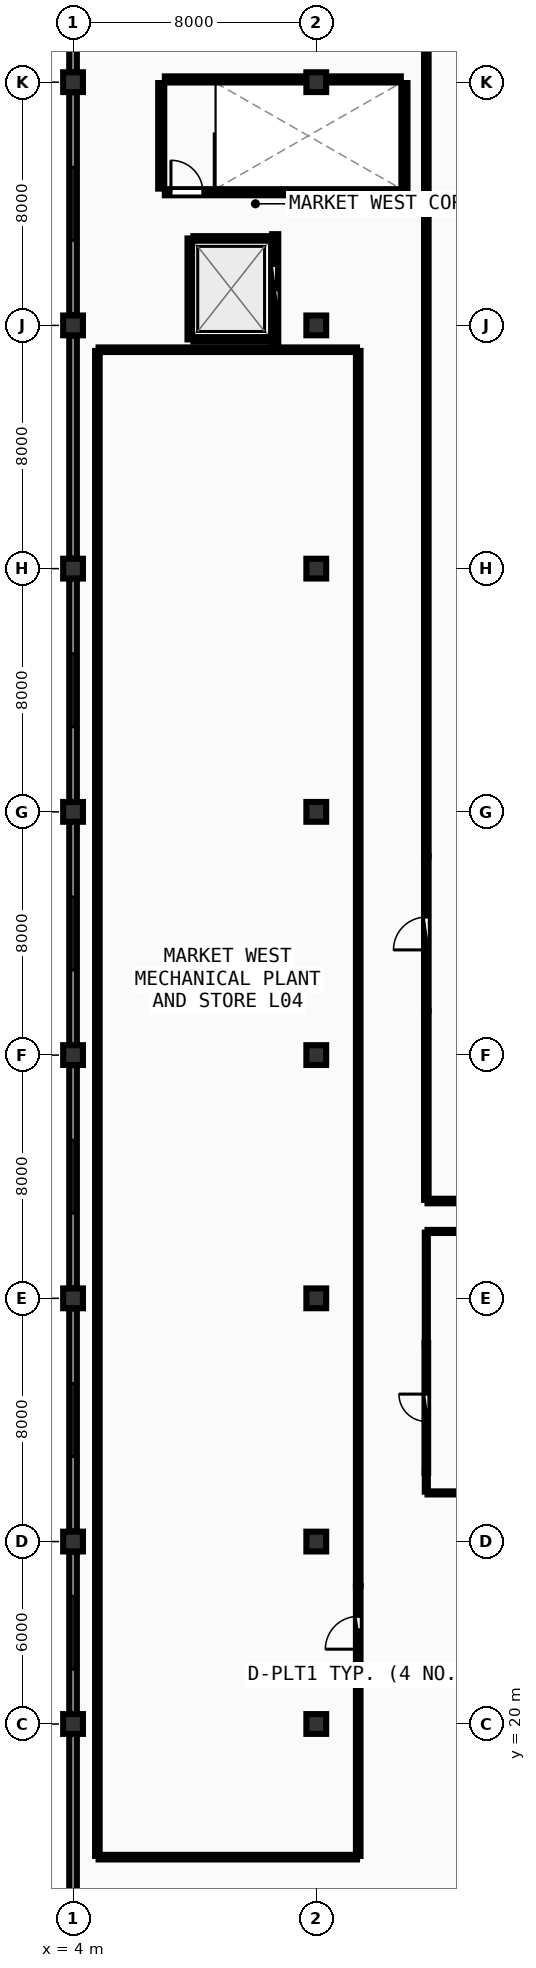
"""IFC4 building model, lengths in metres.
Left out: names, types, materials, properties, quantities, classifications, styles, units other than length and angle.
Written with IfcOpenShell. Run it as: python <this file> out.ifc"""

import sys

from ifc_helpers import new_model, si_unit, direction, frame, frame_2d, origin, origin_2d, place, context, subcontext, project, spatial, rectangle, extrude, element, fill, save


model = new_model("IFC4")
c1 = context("Model", 3, precision=1e-05, world=origin(), true_north=direction((0.0, 1.0)))
c2 = subcontext(c1, "Body", "Model", "MODEL_VIEW")
j1 = project(units=[si_unit("LENGTHUNIT", "METRE"), si_unit("PLANEANGLEUNIT", "RADIAN")], contexts=[c1])
p1 = place(None, origin())
s1 = spatial("IfcSite", under=j1, at=p1, CompositionType="ELEMENT")
p2 = place(p1, origin())
s2 = spatial("IfcBuilding", under=s1, at=p2, CompositionType="ELEMENT")
p3 = place(p2, frame((0.0, 0.0, 18.0)))
s3 = spatial("IfcBuildingStorey", under=s2, at=p3, CompositionType="ELEMENT", Elevation=18.0)
for number, where, z_axis, x_axis in (
    (1, (4.0, 20.0, 0.0), (0.0, 0.0, 1.0), (1.0, 0.0, 0.0)),
    (2, (4.0, 26.0, 0.0), (0.0, 0.0, 1.0), (1.0, 0.0, 0.0)),
    (3, (4.0, 34.0, 0.0), (0.0, 0.0, 1.0), (1.0, 0.0, 0.0)),
    (4, (4.0, 42.0, 0.0), (0.0, 0.0, 1.0), (1.0, 0.0, 0.0)),
    (5, (4.0, 50.0, 0.0), (0.0, 0.0, 1.0), (1.0, 0.0, 0.0)),
    (6, (4.0, 58.0, 0.0), (0.0, 0.0, 1.0), (1.0, 0.0, 0.0)),
    (7, (4.0, 66.0, 0.0), (0.0, 0.0, 1.0), (1.0, 0.0, 0.0)),
    (8, (4.0, 74.0, 0.0), (0.0, 0.0, 1.0), (1.0, 0.0, 0.0)),
    (9, (12.0, 20.0, 0.0), (0.0, 0.0, 1.0), (1.0, 0.0, 0.0)),
    (10, (12.0, 26.0, 0.0), (0.0, 0.0, 1.0), (1.0, 0.0, 0.0)),
    (11, (12.0, 34.0, 0.0), (0.0, 0.0, 1.0), (1.0, 0.0, 0.0)),
    (12, (12.0, 42.0, 0.0), (0.0, 0.0, 1.0), (1.0, 0.0, 0.0)),
    (13, (12.0, 50.0, 0.0), (0.0, 0.0, 1.0), (1.0, 0.0, 0.0)),
    (14, (12.0, 58.0, 0.0), (0.0, 0.0, 1.0), (1.0, 0.0, 0.0)),
    (15, (12.0, 66.0, 0.0), (0.0, 0.0, 1.0), (1.0, 0.0, 0.0)),
    (16, (12.0, 74.0, 0.0), (0.0, 0.0, 1.0), (1.0, 0.0, 0.0)),
):
    element("IfcColumn", number, at=place(p3, frame(where, z_axis=z_axis, x_axis=x_axis)), inside=s3, PredefinedType="COLUMN", context=c2, shape_type="SweptSolid", body=[
        extrude(rectangle(XDim=0.65, YDim=0.65, at=origin_2d()), origin(), (0.0, 0.0, 1.0), 4.5),
    ])
p4 = place(p3, frame((4.0, 81.67, 0.0), z_axis=(0.0, 0.0, 1.0), x_axis=(0.0, -1.0, 0.0)))
e17 = element("IfcWall", 17, at=p4, inside=s3, PredefinedType="SOLIDWALL", context=c2, shape_type="SweptSolid", body=[
    extrude(rectangle(XDim=7.34, YDim=0.25, at=frame_2d((3.67, 0.0))), origin(), (0.0, 0.0, 1.0), 3.44),
])
p5 = place(p4, frame((2.47, 0.0, 0.95)))
e18 = element("IfcOpeningElement", 18, at=p5, cuts=e17, PredefinedType="OPENING", context=c2, shape_type="SweptSolid", body=[
    extrude(rectangle(XDim=2.4, YDim=1.65, at=frame_2d((1.2, 0.825))), frame((0.0, 0.135, 0.0), z_axis=(0.0, -1.0, 0.0), x_axis=(1.0, 0.0, 0.0)), (0.0, 0.0, 1.0), 0.27),
])
p6 = place(p3, frame((4.0, 73.67, 0.0), z_axis=(0.0, 0.0, 1.0), x_axis=(0.0, -1.0, 0.0)))
e19 = element("IfcWall", 19, at=p6, inside=s3, PredefinedType="SOLIDWALL", context=c2, shape_type="SweptSolid", body=[
    extrude(rectangle(XDim=7.34, YDim=0.25, at=frame_2d((3.67, 0.0))), origin(), (0.0, 0.0, 1.0), 3.44),
])
p7 = place(p6, frame((2.47, 0.0, 0.95)))
e20 = element("IfcOpeningElement", 20, at=p7, cuts=e19, PredefinedType="OPENING", context=c2, shape_type="SweptSolid", body=[
    extrude(rectangle(XDim=2.4, YDim=1.65, at=frame_2d((1.2, 0.825))), frame((0.0, 0.135, 0.0), z_axis=(0.0, -1.0, 0.0), x_axis=(1.0, 0.0, 0.0)), (0.0, 0.0, 1.0), 0.27),
])
p8 = place(p3, frame((4.0, 65.67, 0.0), z_axis=(0.0, 0.0, 1.0), x_axis=(0.0, -1.0, 0.0)))
e21 = element("IfcWall", 21, at=p8, inside=s3, PredefinedType="SOLIDWALL", context=c2, shape_type="SweptSolid", body=[
    extrude(rectangle(XDim=7.34, YDim=0.25, at=frame_2d((3.67, 0.0))), origin(), (0.0, 0.0, 1.0), 3.44),
])
p9 = place(p3, frame((4.0, 57.67, 0.0), z_axis=(0.0, 0.0, 1.0), x_axis=(0.0, -1.0, 0.0)))
e22 = element("IfcWall", 22, at=p9, inside=s3, PredefinedType="SOLIDWALL", context=c2, shape_type="SweptSolid", body=[
    extrude(rectangle(XDim=7.34, YDim=0.25, at=frame_2d((3.67, 0.0))), origin(), (0.0, 0.0, 1.0), 3.44),
])
p10 = place(p9, frame((2.47, 0.0, 0.95)))
e23 = element("IfcOpeningElement", 23, at=p10, cuts=e22, PredefinedType="OPENING", context=c2, shape_type="SweptSolid", body=[
    extrude(rectangle(XDim=2.4, YDim=1.65, at=frame_2d((1.2, 0.825))), frame((0.0, 0.135, 0.0), z_axis=(0.0, -1.0, 0.0), x_axis=(1.0, 0.0, 0.0)), (0.0, 0.0, 1.0), 0.27),
])
p11 = place(p3, frame((4.0, 49.67, 0.0), z_axis=(0.0, 0.0, 1.0), x_axis=(0.0, -1.0, 0.0)))
e24 = element("IfcWall", 24, at=p11, inside=s3, PredefinedType="SOLIDWALL", context=c2, shape_type="SweptSolid", body=[
    extrude(rectangle(XDim=7.34, YDim=0.25, at=frame_2d((3.67, 0.0))), origin(), (0.0, 0.0, 1.0), 3.44),
])
p12 = place(p11, frame((2.47, 0.0, 0.95)))
e25 = element("IfcOpeningElement", 25, at=p12, cuts=e24, PredefinedType="OPENING", context=c2, shape_type="SweptSolid", body=[
    extrude(rectangle(XDim=2.4, YDim=1.65, at=frame_2d((1.2, 0.825))), frame((0.0, 0.135, 0.0), z_axis=(0.0, -1.0, 0.0), x_axis=(1.0, 0.0, 0.0)), (0.0, 0.0, 1.0), 0.27),
])
p13 = place(p3, frame((4.0, 41.67, 0.0), z_axis=(0.0, 0.0, 1.0), x_axis=(0.0, -1.0, 0.0)))
e26 = element("IfcWall", 26, at=p13, inside=s3, PredefinedType="SOLIDWALL", context=c2, shape_type="SweptSolid", body=[
    extrude(rectangle(XDim=7.34, YDim=0.25, at=frame_2d((3.67, 0.0))), origin(), (0.0, 0.0, 1.0), 3.44),
])
p14 = place(p13, frame((2.47, 0.0, 0.95)))
e27 = element("IfcOpeningElement", 27, at=p14, cuts=e26, PredefinedType="OPENING", context=c2, shape_type="SweptSolid", body=[
    extrude(rectangle(XDim=2.4, YDim=1.65, at=frame_2d((1.2, 0.825))), frame((0.0, 0.135, 0.0), z_axis=(0.0, -1.0, 0.0), x_axis=(1.0, 0.0, 0.0)), (0.0, 0.0, 1.0), 0.27),
])
p15 = place(p3, frame((4.0, 33.67, 0.0), z_axis=(0.0, 0.0, 1.0), x_axis=(0.0, -1.0, 0.0)))
e28 = element("IfcWall", 28, at=p15, inside=s3, PredefinedType="SOLIDWALL", context=c2, shape_type="SweptSolid", body=[
    extrude(rectangle(XDim=7.34, YDim=0.25, at=frame_2d((3.67, 0.0))), origin(), (0.0, 0.0, 1.0), 3.44),
])
p16 = place(p15, frame((2.47, 0.0, 0.95)))
e29 = element("IfcOpeningElement", 29, at=p16, cuts=e28, PredefinedType="OPENING", context=c2, shape_type="SweptSolid", body=[
    extrude(rectangle(XDim=2.4, YDim=1.65, at=frame_2d((1.2, 0.825))), frame((0.0, 0.135, 0.0), z_axis=(0.0, -1.0, 0.0), x_axis=(1.0, 0.0, 0.0)), (0.0, 0.0, 1.0), 0.27),
])
p17 = place(p3, frame((4.0, 25.67, 0.0), z_axis=(0.0, 0.0, 1.0), x_axis=(0.0, -1.0, 0.0)))
e30 = element("IfcWall", 30, at=p17, inside=s3, PredefinedType="SOLIDWALL", context=c2, shape_type="SweptSolid", body=[
    extrude(rectangle(XDim=5.34, YDim=0.25, at=frame_2d((2.67, 0.0))), origin(), (0.0, 0.0, 1.0), 3.44),
])
p18 = place(p17, frame((1.47, 0.0, 0.95)))
e31 = element("IfcOpeningElement", 31, at=p18, cuts=e30, PredefinedType="OPENING", context=c2, shape_type="SweptSolid", body=[
    extrude(rectangle(XDim=2.4, YDim=1.65, at=frame_2d((1.2, 0.825))), frame((0.0, 0.135, 0.0), z_axis=(0.0, -1.0, 0.0), x_axis=(1.0, 0.0, 0.0)), (0.0, 0.0, 1.0), 0.27),
])
p19 = place(p3, frame((4.0, 19.67, 0.0), z_axis=(0.0, 0.0, 1.0), x_axis=(0.0, -1.0, 0.0)))
e32 = element("IfcWall", 32, at=p19, inside=s3, PredefinedType="SOLIDWALL", context=c2, shape_type="SweptSolid", body=[
    extrude(rectangle(XDim=7.34, YDim=0.25, at=frame_2d((3.67, 0.0))), origin(), (0.0, 0.0, 1.0), 3.44),
])
p20 = place(p3, frame((7.02, 70.38, 0.0), z_axis=(0.0, 0.0, 1.0), x_axis=(1.0, 0.0, 0.0)))
e33 = element("IfcWall", 33, at=p20, inside=s3, PredefinedType="SHEAR", context=c2, shape_type="SweptSolid", body=[
    extrude(rectangle(XDim=7.76, YDim=0.2, at=frame_2d((3.88, 0.0))), origin(), (0.0, 0.0, 1.0), 4.26),
])
p21 = place(p20, frame((0.2, 0.0, 0.0)))
e34 = element("IfcOpeningElement", 34, at=p21, cuts=e33, PredefinedType="OPENING", context=c2, shape_type="SweptSolid", body=[
    extrude(rectangle(XDim=1.05, YDim=2.1, at=frame_2d((0.525, 1.05))), frame((0.0, 0.11, 0.0), z_axis=(0.0, -1.0, 0.0), x_axis=(1.0, 0.0, 0.0)), (0.0, 0.0, 1.0), 0.22),
])
p22 = place(p3, frame((14.9, 70.5, 0.0), z_axis=(0.0, 0.0, 1.0), x_axis=(0.0, 1.0, 0.0)))
e35 = element("IfcWall", 35, at=p22, inside=s3, PredefinedType="SHEAR", context=c2, shape_type="SweptSolid", body=[
    extrude(rectangle(XDim=3.47, YDim=0.2, at=frame_2d((1.735, 0.0))), origin(), (0.0, 0.0, 1.0), 4.26),
])
p23 = place(p3, frame((14.78, 74.09, 0.0), z_axis=(0.0, 0.0, 1.0), x_axis=(-1.0, 0.0, 0.0)))
e36 = element("IfcWall", 36, at=p23, inside=s3, PredefinedType="SHEAR", context=c2, shape_type="SweptSolid", body=[
    extrude(rectangle(XDim=7.76, YDim=0.2, at=frame_2d((3.88, 0.0))), origin(), (0.0, 0.0, 1.0), 4.26),
])
p24 = place(p3, frame((6.9, 73.97, 0.0), z_axis=(0.0, 0.0, 1.0), x_axis=(0.0, -1.0, 0.0)))
e37 = element("IfcWall", 37, at=p24, inside=s3, PredefinedType="SHEAR", context=c2, shape_type="SweptSolid", body=[
    extrude(rectangle(XDim=3.47, YDim=0.2, at=frame_2d((1.735, 0.0))), origin(), (0.0, 0.0, 1.0), 4.26),
])
p25 = place(p3, frame((10.65, 65.4, 0.0), z_axis=(0.0, 0.0, 1.0), x_axis=(0.0, 1.0, 0.0)))
e38 = element("IfcWall", 38, at=p25, inside=s3, PredefinedType="SOLIDWALL", context=c2, shape_type="SweptSolid", body=[
    extrude(rectangle(XDim=3.6, YDim=0.2, at=frame_2d((1.8, 0.0))), origin(), (0.0, 0.0, 1.0), 3.445),
])
p26 = place(p25, frame((1.02, 0.0, 0.0)))
e39 = element("IfcOpeningElement", 39, at=p26, cuts=e38, PredefinedType="OPENING", context=c2, shape_type="SweptSolid", body=[
    extrude(rectangle(XDim=1.55, YDim=2.2, at=frame_2d((0.775, 1.1))), frame((0.0, 0.11, 0.0), z_axis=(0.0, -1.0, 0.0), x_axis=(1.0, 0.0, 0.0)), (0.0, 0.0, 1.0), 0.22),
])
p27 = place(p3, frame((7.84, 65.54, 0.0), z_axis=(0.0, 0.0, 1.0), x_axis=(0.0, 1.0, 0.0)))
e40 = element("IfcWall", 40, at=p27, inside=s3, PredefinedType="PARTITIONING", context=c2, shape_type="SweptSolid", body=[
    extrude(rectangle(XDim=3.32, YDim=0.15, at=frame_2d((1.66, 0.0))), origin(), (0.0, 0.0, 1.0), 3.445),
])
for number, where, z_axis, x_axis in (
    (41, (7.96, 65.54, 0.0), (0.0, 0.0, 1.0), (1.0, 0.0, 0.0)),
    (42, (7.96, 68.86, 0.0), (0.0, 0.0, 1.0), (1.0, 0.0, 0.0)),
):
    element("IfcWall", number, at=place(p3, frame(where, z_axis=z_axis, x_axis=x_axis)), inside=s3, PredefinedType="PARTITIONING", context=c2, shape_type="SweptSolid", body=[
        extrude(rectangle(XDim=2.56, YDim=0.15, at=frame_2d((1.28, 0.0))), origin(), (0.0, 0.0, 1.0), 4.25),
    ])
p28 = place(p3, frame((15.62, 28.26, 0.0), z_axis=(0.0, 0.0, 1.0), x_axis=(0.0, 1.0, 0.0)))
e43 = element("IfcWall", 43, at=p28, inside=s3, PredefinedType="PARTITIONING", context=c2, shape_type="SweptSolid", body=[
    extrude(rectangle(XDim=4.28, YDim=0.12, at=frame_2d((2.14, 0.0))), origin(), (0.0, 0.0, 1.0), 4.23),
])
p29 = place(p28, frame((1.69, 0.0, 0.0)))
e44 = element("IfcOpeningElement", 44, at=p29, cuts=e43, PredefinedType="OPENING", context=c2, shape_type="SweptSolid", body=[
    extrude(rectangle(XDim=0.9, YDim=2.08, at=frame_2d((0.45, 1.04))), frame((0.0, 0.07, 0.0), z_axis=(0.0, -1.0, 0.0), x_axis=(1.0, 0.0, 0.0)), (0.0, 0.0, 1.0), 0.14),
])
p30 = place(p3, frame((15.62, 43.46, 0.0), z_axis=(0.0, 0.0, 1.0), x_axis=(0.0, 1.0, 0.0)))
e45 = element("IfcWall", 45, at=p30, inside=s3, PredefinedType="PARTITIONING", context=c2, shape_type="SweptSolid", body=[
    extrude(rectangle(XDim=5.08, YDim=0.15, at=frame_2d((2.54, 0.0))), origin(), (0.0, 0.0, 1.0), 4.23),
])
p31 = place(p30, frame((2.0, 0.0, 0.0)))
e46 = element("IfcOpeningElement", 46, at=p31, cuts=e45, PredefinedType="OPENING", context=c2, shape_type="SweptSolid", body=[
    extrude(rectangle(XDim=1.08, YDim=2.1, at=frame_2d((0.54, 1.05))), frame((0.0, 0.085, 0.0), z_axis=(0.0, -1.0, 0.0), x_axis=(1.0, 0.0, 0.0)), (0.0, 0.0, 1.0), 0.17),
])
p32 = place(p3, frame((13.38, 21.46, 0.0), z_axis=(0.0, 0.0, 1.0), x_axis=(0.0, 1.0, 0.0)))
e47 = element("IfcWall", 47, at=p32, inside=s3, PredefinedType="PARTITIONING", context=c2, shape_type="SweptSolid", body=[
    extrude(rectangle(XDim=3.08, YDim=0.15, at=frame_2d((1.54, 0.0))), origin(), (0.0, 0.0, 1.0), 4.23),
])
p33 = place(p32, frame((1.0, 0.0, 0.0)))
e48 = element("IfcOpeningElement", 48, at=p33, cuts=e47, PredefinedType="OPENING", context=c2, shape_type="SweptSolid", body=[
    extrude(rectangle(XDim=1.08, YDim=2.1, at=frame_2d((0.54, 1.05))), frame((0.0, 0.085, 0.0), z_axis=(0.0, -1.0, 0.0), x_axis=(1.0, 0.0, 0.0)), (0.0, 0.0, 1.0), 0.17),
])
for number, where, z_axis, x_axis in (
    (49, (15.66, 27.6, 0.0), (0.0, 0.0, 1.0), (1.0, 0.0, 0.0)),
    (50, (35.16, 36.2, 0.0), (0.0, 0.0, 1.0), (-1.0, 0.0, 0.0)),
):
    element("IfcWall", number, at=place(p3, frame(where, z_axis=z_axis, x_axis=x_axis)), inside=s3, PredefinedType="PARTITIONING", context=c2, shape_type="SweptSolid", body=[
        extrude(rectangle(XDim=19.5, YDim=0.1, at=frame_2d((9.75, 0.0))), origin(), (0.0, 0.0, 1.0), 3.445),
    ])
p34 = place(p3, frame((15.62, 36.16, 0.0), z_axis=(0.0, 0.0, 1.0), x_axis=(0.0, -1.0, 0.0)))
e51 = element("IfcWall", 51, at=p34, inside=s3, PredefinedType="PARTITIONING", context=c2, shape_type="SweptSolid", body=[
    extrude(rectangle(XDim=3.62, YDim=0.1, at=frame_2d((1.81, 0.0))), origin(), (0.0, 0.0, 1.0), 3.445),
])
p35 = place(p3, frame((15.62, 28.26, 0.0), z_axis=(0.0, 0.0, 1.0), x_axis=(0.0, -1.0, 0.0)))
e52 = element("IfcWall", 52, at=p35, inside=s3, PredefinedType="PARTITIONING", context=c2, shape_type="SweptSolid", body=[
    extrude(rectangle(XDim=0.62, YDim=0.1, at=frame_2d((0.31, 0.0))), origin(), (0.0, 0.0, 1.0), 4.23),
])
p36 = place(p3, frame((15.66, 37.2, 0.0), z_axis=(0.0, 0.0, 1.0), x_axis=(1.0, 0.0, 0.0)))
e53 = element("IfcWall", 53, at=p36, inside=s3, PredefinedType="PARTITIONING", context=c2, shape_type="SweptSolid", body=[
    extrude(rectangle(XDim=19.5, YDim=0.15, at=frame_2d((9.75, 0.0))), origin(), (0.0, 0.0, 1.0), 3.445),
])
p37 = place(p3, frame((15.62, 81.16, 0.0), z_axis=(0.0, 0.0, 1.0), x_axis=(0.0, -1.0, 0.0)))
e54 = element("IfcWall", 54, at=p37, inside=s3, PredefinedType="PARTITIONING", context=c2, shape_type="SweptSolid", body=[
    extrude(rectangle(XDim=32.62, YDim=0.15, at=frame_2d((16.31, 0.0))), origin(), (0.0, 0.0, 1.0), 3.445),
])
p38 = place(p3, frame((15.62, 43.46, 0.0), z_axis=(0.0, 0.0, 1.0), x_axis=(0.0, -1.0, 0.0)))
e55 = element("IfcWall", 55, at=p38, inside=s3, PredefinedType="PARTITIONING", context=c2, shape_type="SweptSolid", body=[
    extrude(rectangle(XDim=6.22, YDim=0.15, at=frame_2d((3.11, 0.0))), origin(), (0.0, 0.0, 1.0), 3.445),
])
p39 = place(p3, frame((4.84, 15.62, 0.0), z_axis=(0.0, 0.0, 1.0), x_axis=(1.0, 0.0, 0.0)))
e56 = element("IfcWall", 56, at=p39, inside=s3, PredefinedType="PARTITIONING", context=c2, shape_type="SweptSolid", body=[
    extrude(rectangle(XDim=8.5, YDim=0.15, at=frame_2d((4.25, 0.0))), origin(), (0.0, 0.0, 1.0), 3.445),
])
p40 = place(p3, frame((13.38, 15.66, 0.0), z_axis=(0.0, 0.0, 1.0), x_axis=(0.0, 1.0, 0.0)))
e57 = element("IfcWall", 57, at=p40, inside=s3, PredefinedType="PARTITIONING", context=c2, shape_type="SweptSolid", body=[
    extrude(rectangle(XDim=5.8, YDim=0.15, at=frame_2d((2.9, 0.0))), origin(), (0.0, 0.0, 1.0), 3.445),
])
p41 = place(p3, frame((13.38, 24.54, 0.0), z_axis=(0.0, 0.0, 1.0), x_axis=(0.0, 1.0, 0.0)))
e58 = element("IfcWall", 58, at=p41, inside=s3, PredefinedType="PARTITIONING", context=c2, shape_type="SweptSolid", body=[
    extrude(rectangle(XDim=40.62, YDim=0.15, at=frame_2d((20.31, 0.0))), origin(), (0.0, 0.0, 1.0), 3.445),
])
p42 = place(p3, frame((13.34, 65.2, 0.0), z_axis=(0.0, 0.0, 1.0), x_axis=(-1.0, 0.0, 0.0)))
e59 = element("IfcWall", 59, at=p42, inside=s3, PredefinedType="PARTITIONING", context=c2, shape_type="SweptSolid", body=[
    extrude(rectangle(XDim=8.5, YDim=0.15, at=frame_2d((4.25, 0.0))), origin(), (0.0, 0.0, 1.0), 3.445),
])
p43 = place(p3, frame((4.8, 65.16, 0.0), z_axis=(0.0, 0.0, 1.0), x_axis=(0.0, -1.0, 0.0)))
e60 = element("IfcWall", 60, at=p43, inside=s3, PredefinedType="PARTITIONING", context=c2, shape_type="SweptSolid", body=[
    extrude(rectangle(XDim=49.5, YDim=0.15, at=frame_2d((24.75, 0.0))), origin(), (0.0, 0.0, 1.0), 3.445),
])
p44 = place(p7, origin())
e61 = element("IfcWindow", 61, at=p44, inside=s3, PartitioningType="SINGLE_PANEL", PredefinedType="WINDOW", context=c2, shape_type="SweptSolid", body=[
    extrude(rectangle(XDim=2.4, YDim=1.65, at=frame_2d((1.2, 0.825))), frame((0.0, 0.03, 0.0), z_axis=(0.0, -1.0, 0.0), x_axis=(1.0, 0.0, 0.0)), (0.0, 0.0, 1.0), 0.06),
])
fill(e20, e61)
p45 = place(p10, origin())
e62 = element("IfcWindow", 62, at=p45, inside=s3, PartitioningType="SINGLE_PANEL", PredefinedType="WINDOW", context=c2, shape_type="SweptSolid", body=[
    extrude(rectangle(XDim=2.4, YDim=1.65, at=frame_2d((1.2, 0.825))), frame((0.0, 0.03, 0.0), z_axis=(0.0, -1.0, 0.0), x_axis=(1.0, 0.0, 0.0)), (0.0, 0.0, 1.0), 0.06),
])
fill(e23, e62)
p46 = place(p12, origin())
e63 = element("IfcWindow", 63, at=p46, inside=s3, PartitioningType="SINGLE_PANEL", PredefinedType="WINDOW", context=c2, shape_type="SweptSolid", body=[
    extrude(rectangle(XDim=2.4, YDim=1.65, at=frame_2d((1.2, 0.825))), frame((0.0, 0.03, 0.0), z_axis=(0.0, -1.0, 0.0), x_axis=(1.0, 0.0, 0.0)), (0.0, 0.0, 1.0), 0.06),
])
fill(e25, e63)
p47 = place(p14, origin())
e64 = element("IfcWindow", 64, at=p47, inside=s3, PartitioningType="SINGLE_PANEL", PredefinedType="WINDOW", context=c2, shape_type="SweptSolid", body=[
    extrude(rectangle(XDim=2.4, YDim=1.65, at=frame_2d((1.2, 0.825))), frame((0.0, 0.03, 0.0), z_axis=(0.0, -1.0, 0.0), x_axis=(1.0, 0.0, 0.0)), (0.0, 0.0, 1.0), 0.06),
])
fill(e27, e64)
p48 = place(p16, origin())
e65 = element("IfcWindow", 65, at=p48, inside=s3, PartitioningType="SINGLE_PANEL", PredefinedType="WINDOW", context=c2, shape_type="SweptSolid", body=[
    extrude(rectangle(XDim=2.4, YDim=1.65, at=frame_2d((1.2, 0.825))), frame((0.0, 0.03, 0.0), z_axis=(0.0, -1.0, 0.0), x_axis=(1.0, 0.0, 0.0)), (0.0, 0.0, 1.0), 0.06),
])
fill(e29, e65)
p49 = place(p18, origin())
e66 = element("IfcWindow", 66, at=p49, inside=s3, PartitioningType="SINGLE_PANEL", PredefinedType="WINDOW", context=c2, shape_type="SweptSolid", body=[
    extrude(rectangle(XDim=2.4, YDim=1.65, at=frame_2d((1.2, 0.825))), frame((0.0, 0.03, 0.0), z_axis=(0.0, -1.0, 0.0), x_axis=(1.0, 0.0, 0.0)), (0.0, 0.0, 1.0), 0.06),
])
fill(e31, e66)
p50 = place(p21, origin())
e67 = element("IfcDoor", 67, at=p50, inside=s3, OperationType="SINGLE_SWING_LEFT", PredefinedType="DOOR", context=c2, shape_type="SweptSolid", body=[
    extrude(rectangle(XDim=1.05, YDim=2.1, at=frame_2d((0.525, 1.05))), frame((0.0, 0.025, 0.0), z_axis=(0.0, -1.0, 0.0), x_axis=(1.0, 0.0, 0.0)), (0.0, 0.0, 1.0), 0.05),
])
fill(e34, e67)
p51 = place(p26, origin())
e68 = element("IfcDoor", 68, at=p51, inside=s3, OperationType="DOUBLE_DOOR_SLIDING", PredefinedType="DOOR", context=c2, shape_type="SweptSolid", body=[
    extrude(rectangle(XDim=1.55, YDim=2.2, at=frame_2d((0.775, 1.1))), frame((0.0, 0.025, 0.0), z_axis=(0.0, -1.0, 0.0), x_axis=(1.0, 0.0, 0.0)), (0.0, 0.0, 1.0), 0.05),
])
fill(e39, e68)
p52 = place(p29, origin())
e69 = element("IfcDoor", 69, at=p52, inside=s3, OperationType="SINGLE_SWING_RIGHT", PredefinedType="DOOR", context=c2, shape_type="SweptSolid", body=[
    extrude(rectangle(XDim=0.9, YDim=2.08, at=frame_2d((0.45, 1.04))), frame((0.0, 0.025, 0.0), z_axis=(0.0, -1.0, 0.0), x_axis=(1.0, 0.0, 0.0)), (0.0, 0.0, 1.0), 0.05),
])
fill(e44, e69)
p53 = place(p31, origin())
e70 = element("IfcDoor", 70, at=p53, inside=s3, OperationType="SINGLE_SWING_LEFT", PredefinedType="DOOR", context=c2, shape_type="SweptSolid", body=[
    extrude(rectangle(XDim=1.08, YDim=2.1, at=frame_2d((0.54, 1.05))), frame((0.0, 0.025, 0.0), z_axis=(0.0, -1.0, 0.0), x_axis=(1.0, 0.0, 0.0)), (0.0, 0.0, 1.0), 0.05),
])
fill(e46, e70)
p54 = place(p33, origin())
e71 = element("IfcDoor", 71, at=p54, inside=s3, OperationType="SINGLE_SWING_LEFT", PredefinedType="DOOR", context=c2, shape_type="SweptSolid", body=[
    extrude(rectangle(XDim=1.08, YDim=2.1, at=frame_2d((0.54, 1.05))), frame((0.0, 0.025, 0.0), z_axis=(0.0, -1.0, 0.0), x_axis=(1.0, 0.0, 0.0)), (0.0, 0.0, 1.0), 0.05),
])
fill(e48, e71)
save(model, sys.argv[1])
